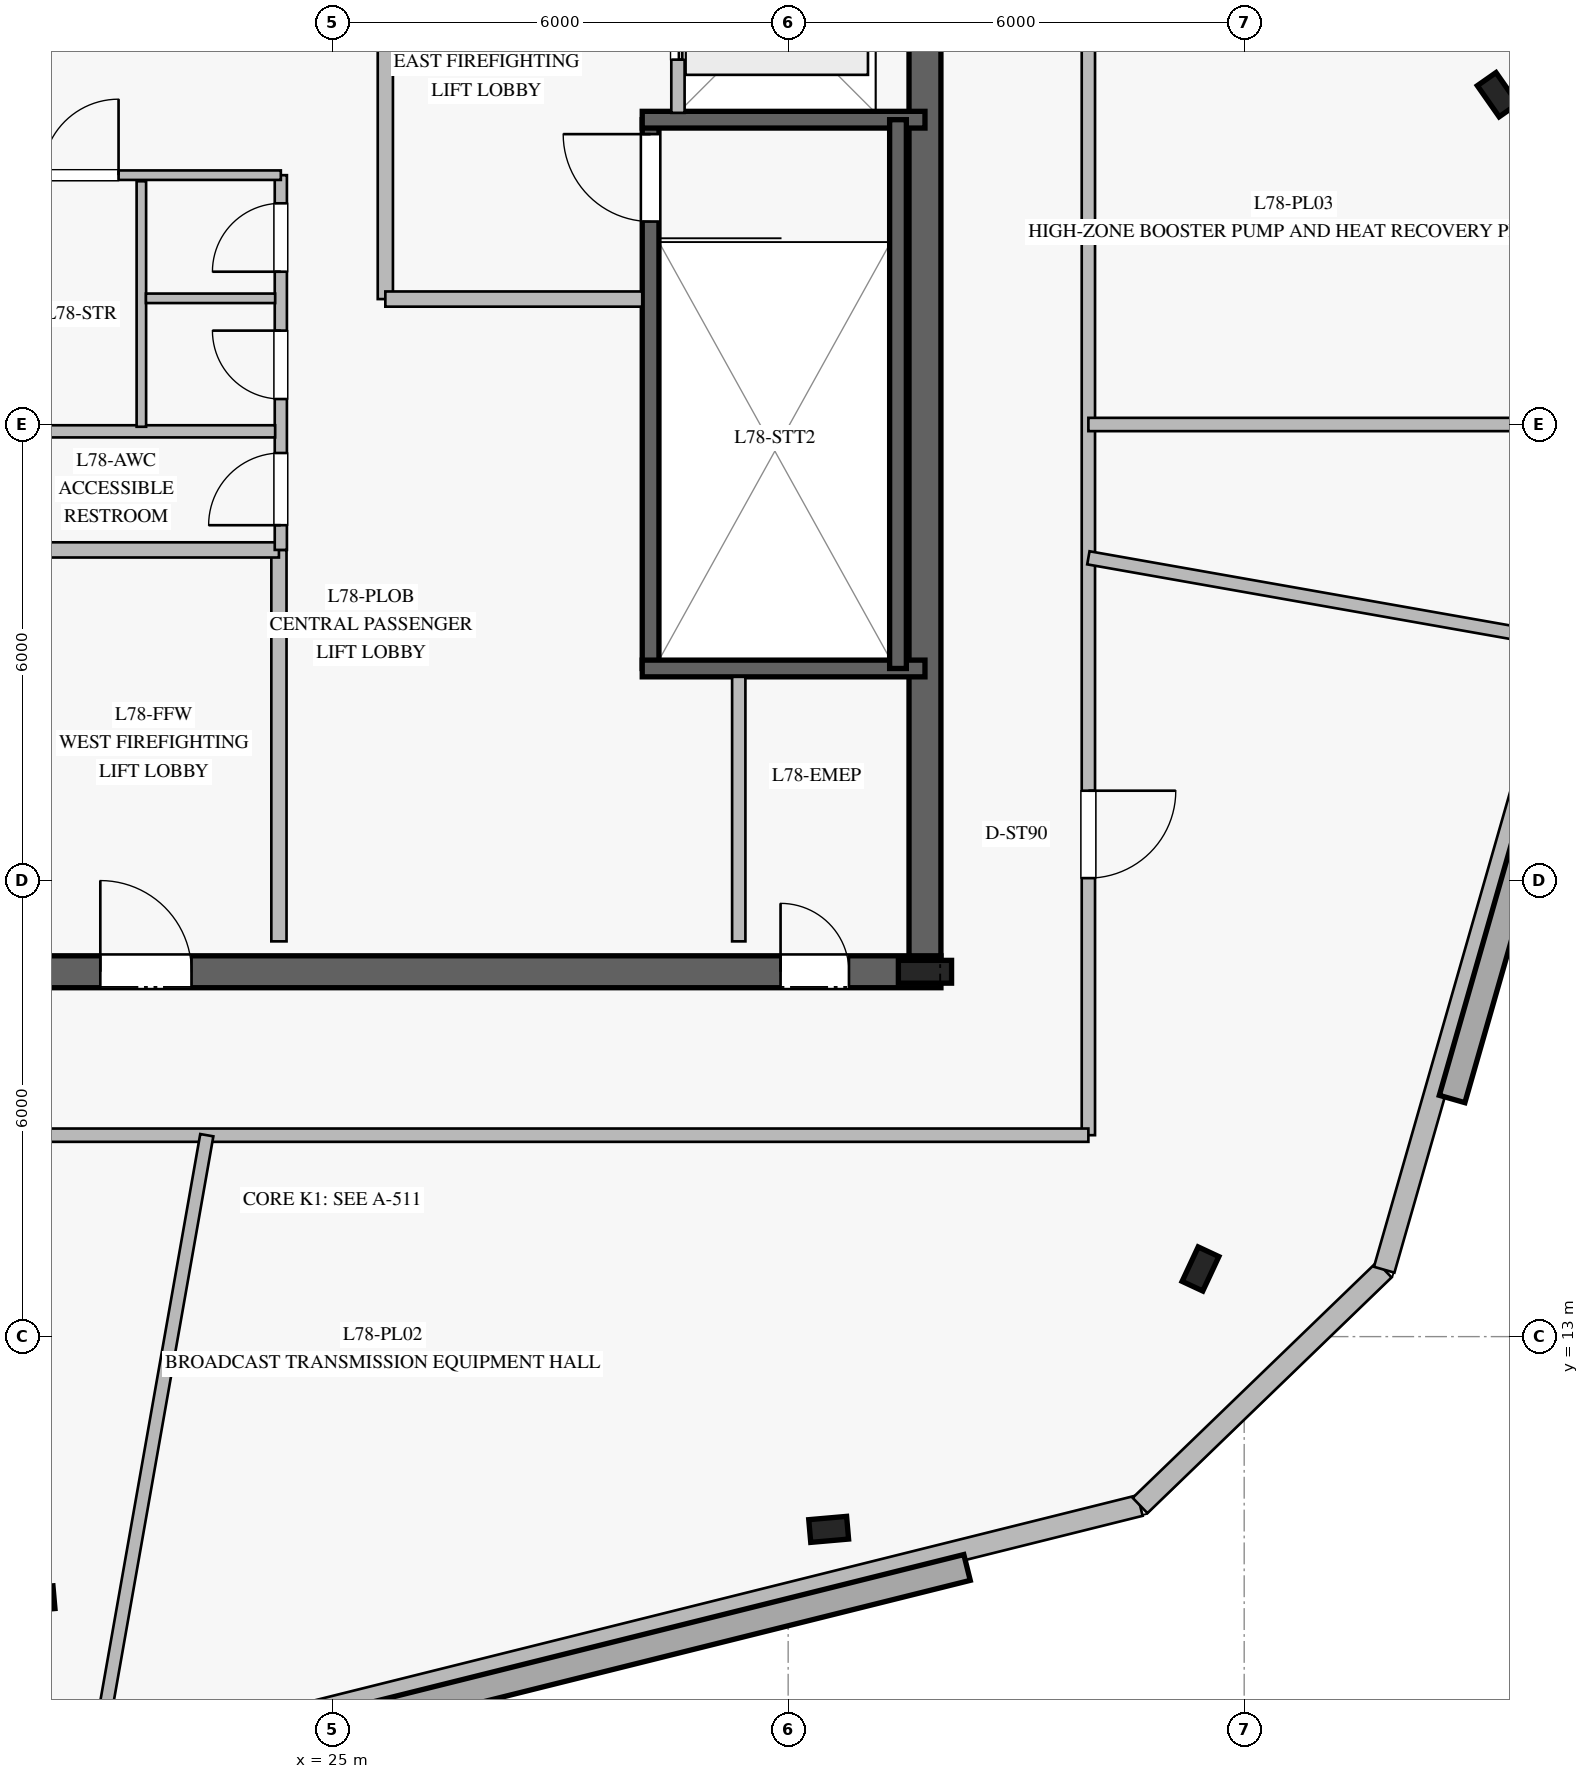
"""IFC4 building model, lengths in metres.
Left out: names, types, materials, properties, quantities, classifications, styles, units other than length and angle.
Written with IfcOpenShell. Run it as: python <this file> out.ifc"""

import sys

from ifc_helpers import new_model, si_unit, direction, frame, frame_2d, origin, origin_2d, place, context, subcontext, project, spatial, rectangle, i_section, extrude, element, fill, save


model = new_model("IFC4")
c1 = context("Model", 3, precision=1e-05, world=origin(), true_north=direction((0.0, 1.0)))
c2 = subcontext(c1, "Body", "Model", "MODEL_VIEW")
j1 = project(units=[si_unit("LENGTHUNIT", "METRE"), si_unit("PLANEANGLEUNIT", "RADIAN")], contexts=[c1])
p1 = place(None, origin())
s1 = spatial("IfcSite", under=j1, at=p1, CompositionType="ELEMENT")
p2 = place(p1, origin())
s2 = spatial("IfcBuilding", under=s1, at=p2, CompositionType="ELEMENT")
p3 = place(p2, frame((0.0, 0.0, 322.6)))
s3 = spatial("IfcBuildingStorey", under=s2, at=p3, CompositionType="ELEMENT", Elevation=322.6)
p4 = place(p3, frame((16.99, 17.8, 0.0), z_axis=(0.0, 0.0, 1.0), x_axis=(1.0, 0.0, 0.0)))
e1 = element("IfcWall", 1, at=p4, inside=s3, PredefinedType="SHEAR", context=c2, shape_type="SweptSolid", body=[
    extrude(rectangle(XDim=16.02, YDim=0.42, at=frame_2d((8.01, 0.0))), origin(), (0.0, 0.0, 1.0), 4.1),
])
p5 = place(p4, frame((4.96, 0.0, 0.0)))
e2 = element("IfcOpeningElement", 2, at=p5, cuts=e1, PredefinedType="OPENING", context=c2, shape_type="SweptSolid", body=[
    extrude(rectangle(XDim=1.2, YDim=2.25, at=frame_2d((0.6, 1.125))), frame((0.0, 0.22, 0.0), z_axis=(0.0, -1.0, 0.0), x_axis=(1.0, 0.0, 0.0)), (0.0, 0.0, 1.0), 0.44),
])
p6 = place(p4, frame((13.91, 0.0, 0.0)))
e3 = element("IfcOpeningElement", 3, at=p6, cuts=e1, PredefinedType="OPENING", context=c2, shape_type="SweptSolid", body=[
    extrude(rectangle(XDim=0.9, YDim=2.1, at=frame_2d((0.45, 1.05))), frame((0.0, 0.22, 0.0), z_axis=(0.0, -1.0, 0.0), x_axis=(1.0, 0.0, 0.0)), (0.0, 0.0, 1.0), 0.44),
])
p7 = place(p3, frame((32.8, 18.01, 0.0), z_axis=(0.0, 0.0, 1.0), x_axis=(0.0, 1.0, 0.0)))
e4 = element("IfcWall", 4, at=p7, inside=s3, PredefinedType="SHEAR", context=c2, shape_type="SweptSolid", body=[
    extrude(rectangle(XDim=13.98, YDim=0.42, at=frame_2d((6.99, 0.0))), origin(), (0.0, 0.0, 1.0), 4.1),
])
p8 = place(p3, frame((32.8, 17.8, 0.0), z_axis=(0.0, 0.0, 1.0), x_axis=(1.0, 0.0, 0.0)))
e5 = element("IfcColumn", 5, at=p8, inside=s3, PredefinedType="COLUMN", context=c2, shape_type="SweptSolid", body=[
    extrude(i_section(OverallWidth=0.3, OverallDepth=0.7, WebThickness=0.017, FlangeThickness=0.032, at=origin_2d()), origin(), (0.0, 0.0, 1.0), 4.4),
])
p9 = place(p3, frame((29.19, 21.79, 0.0), z_axis=(0.0, 0.0, 1.0), x_axis=(0.0, 1.0, 0.0)))
e6 = element("IfcWall", 6, at=p9, inside=s3, PredefinedType="SOLIDWALL", context=c2, shape_type="SweptSolid", body=[
    extrude(rectangle(XDim=7.22, YDim=0.22, at=frame_2d((3.61, 0.0))), origin(), (0.0, 0.0, 1.0), 4.1),
])
p10 = place(p9, frame((5.88, 0.0, 0.0)))
e7 = element("IfcOpeningElement", 7, at=p10, cuts=e6, PredefinedType="OPENING", context=c2, shape_type="SweptSolid", body=[
    extrude(rectangle(XDim=1.15, YDim=2.2, at=frame_2d((0.575, 1.1))), frame((0.0, 0.12, 0.0), z_axis=(0.0, -1.0, 0.0), x_axis=(1.0, 0.0, 0.0)), (0.0, 0.0, 1.0), 0.24),
])
for number, where, z_axis, x_axis in (
    (8, (29.08, 21.79, 0.0), (0.0, 0.0, 1.0), (1.0, 0.0, 0.0)),
    (9, (29.08, 29.01, 0.0), (0.0, 0.0, 1.0), (1.0, 0.0, 0.0)),
):
    element("IfcWall", number, at=place(p3, frame(where, z_axis=z_axis, x_axis=x_axis)), inside=s3, PredefinedType="SOLIDWALL", context=c2, shape_type="SweptSolid", body=[
        extrude(rectangle(XDim=3.72, YDim=0.22, at=frame_2d((1.86, 0.0))), origin(), (0.0, 0.0, 1.0), 4.1),
    ])
p11 = place(p3, frame((32.445, 29.01, 0.0), z_axis=(0.0, 0.0, 1.0), x_axis=(0.0, -1.0, 0.0)))
e10 = element("IfcWall", 10, at=p11, inside=s3, PredefinedType="SOLIDWALL", context=c2, shape_type="SweptSolid", body=[
    extrude(rectangle(XDim=7.22, YDim=0.22, at=frame_2d((3.61, 0.0))), origin(), (0.0, 0.0, 1.0), 4.1),
])
for number, where, z_axis, x_axis in (
    (11, (31.533, 10.464, 0.0), (0.0, 0.0, 1.0), (0.996, 0.087, 0.0)),
    (12, (36.425, 13.89, 0.0), (0.0, 0.0, 1.0), (0.423, 0.906, 0.0)),
    (13, (40.334, 29.339, 0.0), (0.0, 0.0, 1.0), (-0.574, 0.819, 0.0)),
):
    element("IfcColumn", number, at=place(p3, frame(where, z_axis=z_axis, x_axis=x_axis)), inside=s3, PredefinedType="COLUMN", context=c2, shape_type="SweptSolid", body=[
        extrude(i_section(OverallWidth=0.3, OverallDepth=0.5, WebThickness=0.014, FlangeThickness=0.028, at=origin_2d()), origin(), (0.0, 0.0, 1.0), 4.4),
    ])
p12 = place(p3, frame((17.999, 8.683, 0.0), z_axis=(0.0, 0.0, 1.0), x_axis=(0.961215848043, -0.275797196272, 0.0)))
e14 = element("IfcWall", 14, at=p12, inside=s3, PredefinedType="STANDARD", context=c2, shape_type="SweptSolid", body=[
    extrude(rectangle(XDim=4.464, YDim=0.28, at=frame_2d((2.232, 0.0))), origin(), (0.0, 0.0, 1.0), 4.1),
])
p13 = place(p3, frame((22.29, 7.452, 0.0), z_axis=(0.0, 0.0, 1.0), x_axis=(0.970292733591, 0.241933898288, 0.0)))
e15 = element("IfcWall", 15, at=p13, inside=s3, PredefinedType="STANDARD", context=c2, shape_type="SweptSolid", body=[
    extrude(rectangle(XDim=13.748, YDim=0.28, at=frame_2d((6.874, 0.0))), origin(), (0.0, 0.0, 1.0), 4.1),
])
p14 = place(p3, frame((35.63, 10.778, 0.0), z_axis=(0.0, 0.0, 1.0), x_axis=(0.719355296742, 0.694642323106, 0.0)))
e16 = element("IfcWall", 16, at=p14, inside=s3, PredefinedType="STANDARD", context=c2, shape_type="SweptSolid", body=[
    extrude(rectangle(XDim=4.465, YDim=0.28, at=frame_2d((2.233, 0.0))), origin(), (0.0, 0.0, 1.0), 4.1),
])
p15 = place(p3, frame((38.842, 13.88, 0.0), z_axis=(0.0, 0.0, 1.0), x_axis=(0.275616991697, 0.961267535022, 0.0)))
e17 = element("IfcWall", 17, at=p15, inside=s3, PredefinedType="STANDARD", context=c2, shape_type="SweptSolid", body=[
    extrude(rectangle(XDim=13.748, YDim=0.28, at=frame_2d((6.874, 0.0))), origin(), (0.0, 0.0, 1.0), 4.1),
])
p16 = place(p3, frame((24.3, 18.2, 0.0), z_axis=(0.0, 0.0, 1.0), x_axis=(0.0, 1.0, 0.0)))
e18 = element("IfcWall", 18, at=p16, inside=s3, PredefinedType="PARTITIONING", context=c2, shape_type="SweptSolid", body=[
    extrude(rectangle(XDim=5.15, YDim=0.2, at=frame_2d((2.575, 0.0))), origin(), (0.0, 0.0, 1.0), 3.37),
])
p17 = place(p3, frame((20.92, 23.35, 0.0), z_axis=(0.0, 0.0, 1.0), x_axis=(1.0, 0.0, 0.0)))
e19 = element("IfcWall", 19, at=p17, inside=s3, PredefinedType="PARTITIONING", context=c2, shape_type="SweptSolid", body=[
    extrude(rectangle(XDim=3.38, YDim=0.2, at=frame_2d((1.69, 0.0))), origin(), (0.0, 0.0, 1.0), 2.82),
])
p18 = place(p3, frame((25.7, 26.65, 0.0), z_axis=(0.0, 0.0, 1.0), x_axis=(0.0, 1.0, 0.0)))
e20 = element("IfcWall", 20, at=p18, inside=s3, PredefinedType="PARTITIONING", context=c2, shape_type="SweptSolid", body=[
    extrude(rectangle(XDim=5.15, YDim=0.2, at=frame_2d((2.575, 0.0))), origin(), (0.0, 0.0, 1.0), 3.37),
])
p19 = place(p3, frame((25.7, 26.65, 0.0), z_axis=(0.0, 0.0, 1.0), x_axis=(1.0, 0.0, 0.0)))
e21 = element("IfcWall", 21, at=p19, inside=s3, PredefinedType="PARTITIONING", context=c2, shape_type="SweptSolid", body=[
    extrude(rectangle(XDim=3.38, YDim=0.2, at=frame_2d((1.69, 0.0))), origin(), (0.0, 0.0, 1.0), 2.82),
])
p20 = place(p3, frame((24.325, 23.35, 0.0), z_axis=(0.0, 0.0, 1.0), x_axis=(0.0, 1.0, 0.0)))
e22 = element("IfcWall", 22, at=p20, inside=s3, PredefinedType="PLUMBINGWALL", context=c2, shape_type="SweptSolid", body=[
    extrude(rectangle(XDim=4.93, YDim=0.16, at=frame_2d((2.465, 0.0))), origin(), (0.0, 0.0, 1.0), 2.82),
])
p21 = place(p20, frame((0.325, 0.0, 0.0)))
e23 = element("IfcOpeningElement", 23, at=p21, cuts=e22, PredefinedType="OPENING", context=c2, shape_type="SweptSolid", body=[
    extrude(rectangle(XDim=0.95, YDim=2.1, at=frame_2d((0.475, 1.05))), frame((0.0, 0.09, 0.0), z_axis=(0.0, -1.0, 0.0), x_axis=(1.0, 0.0, 0.0)), (0.0, 0.0, 1.0), 0.18),
])
p22 = place(p20, frame((1.985, 0.0, 0.0)))
e24 = element("IfcOpeningElement", 24, at=p22, cuts=e22, PredefinedType="OPENING", context=c2, shape_type="SweptSolid", body=[
    extrude(rectangle(XDim=0.9, YDim=2.1, at=frame_2d((0.45, 1.05))), frame((0.0, 0.09, 0.0), z_axis=(0.0, -1.0, 0.0), x_axis=(1.0, 0.0, 0.0)), (0.0, 0.0, 1.0), 0.18),
])
p23 = place(p20, frame((3.66, 0.0, 0.0)))
e25 = element("IfcOpeningElement", 25, at=p23, cuts=e22, PredefinedType="OPENING", context=c2, shape_type="SweptSolid", body=[
    extrude(rectangle(XDim=0.9, YDim=2.1, at=frame_2d((0.45, 1.05))), frame((0.0, 0.09, 0.0), z_axis=(0.0, -1.0, 0.0), x_axis=(1.0, 0.0, 0.0)), (0.0, 0.0, 1.0), 0.18),
])
p24 = place(p3, frame((20.92, 28.28, 0.0), z_axis=(0.0, 0.0, 1.0), x_axis=(1.0, 0.0, 0.0)))
e26 = element("IfcWall", 26, at=p24, inside=s3, PredefinedType="PARTITIONING", context=c2, shape_type="SweptSolid", body=[
    extrude(rectangle(XDim=3.405, YDim=0.125, at=frame_2d((1.703, 0.0))), origin(), (0.0, 0.0, 1.0), 2.82),
])
p25 = place(p24, frame((0.27, 0.0, 0.0)))
e27 = element("IfcOpeningElement", 27, at=p25, cuts=e26, PredefinedType="OPENING", context=c2, shape_type="SweptSolid", body=[
    extrude(rectangle(XDim=1.0, YDim=2.15, at=frame_2d((0.5, 1.075))), frame((0.0, 0.073, 0.0), z_axis=(0.0, -1.0, 0.0), x_axis=(1.0, 0.0, 0.0)), (0.0, 0.0, 1.0), 0.145),
])
p26 = place(p3, frame((20.95, 24.91, 0.0), z_axis=(0.0, 0.0, 1.0), x_axis=(1.0, 0.0, 0.0)))
e28 = element("IfcWall", 28, at=p26, inside=s3, PredefinedType="PLUMBINGWALL", context=c2, shape_type="SweptSolid", body=[
    extrude(rectangle(XDim=3.3, YDim=0.16, at=frame_2d((1.65, 0.0))), origin(), (0.0, 0.0, 1.0), 2.82),
])
p27 = place(p3, frame((22.49, 24.97, 0.0), z_axis=(0.0, 0.0, 1.0), x_axis=(0.0, 1.0, 0.0)))
e29 = element("IfcWall", 29, at=p27, inside=s3, PredefinedType="PARTITIONING", context=c2, shape_type="SweptSolid", body=[
    extrude(rectangle(XDim=3.23, YDim=0.125, at=frame_2d((1.615, 0.0))), origin(), (0.0, 0.0, 1.0), 2.82),
])
p28 = place(p3, frame((22.55, 26.66, 0.0), z_axis=(0.0, 0.0, 1.0), x_axis=(1.0, 0.0, 0.0)))
e30 = element("IfcWall", 30, at=p28, inside=s3, PredefinedType="PARTITIONING", context=c2, shape_type="SweptSolid", body=[
    extrude(rectangle(XDim=1.7, YDim=0.125, at=frame_2d((0.85, 0.0))), origin(), (0.0, 0.0, 1.0), 2.82),
])
p29 = place(p3, frame((30.35, 18.2, 0.0), z_axis=(0.0, 0.0, 1.0), x_axis=(0.0, 1.0, 0.0)))
e31 = element("IfcWall", 31, at=p29, inside=s3, PredefinedType="PARTITIONING", context=c2, shape_type="SweptSolid", body=[
    extrude(rectangle(XDim=3.48, YDim=0.175, at=frame_2d((1.74, 0.0))), origin(), (0.0, 0.0, 1.0), 4.17),
])
p30 = place(p3, frame((29.55, 29.1, 0.0), z_axis=(0.0, 0.0, 1.0), x_axis=(0.0, 1.0, 0.0)))
e32 = element("IfcWall", 32, at=p30, inside=s3, PredefinedType="PARTITIONING", context=c2, shape_type="SweptSolid", body=[
    extrude(rectangle(XDim=2.6, YDim=0.175, at=frame_2d((1.3, 0.0))), origin(), (0.0, 0.0, 1.0), 4.17),
])
p31 = place(p30, frame((0.7, 0.0, 0.0)))
e33 = element("IfcOpeningElement", 33, at=p31, cuts=e32, PredefinedType="OPENING", context=c2, shape_type="SweptSolid", body=[
    extrude(rectangle(XDim=1.2, YDim=2.2, at=frame_2d((0.6, 1.1))), frame((0.0, 0.098, 0.0), z_axis=(0.0, -1.0, 0.0), x_axis=(1.0, 0.0, 0.0)), (0.0, 0.0, 1.0), 0.195),
])
p32 = place(p3, frame((34.95, 34.35, 0.0), z_axis=(0.0, 0.0, 1.0), x_axis=(0.0, -1.0, 0.0)))
e34 = element("IfcWall", 34, at=p32, inside=s3, PredefinedType="PARTITIONING", context=c2, shape_type="SweptSolid", body=[
    extrude(rectangle(XDim=18.7, YDim=0.175, at=frame_2d((9.35, 0.0))), origin(), (0.0, 0.0, 1.0), 3.6),
])
p33 = place(p32, frame((14.168, 0.0, 0.0)))
e35 = element("IfcOpeningElement", 35, at=p33, cuts=e34, PredefinedType="OPENING", context=c2, shape_type="SweptSolid", body=[
    extrude(rectangle(XDim=1.15, YDim=2.2, at=frame_2d((0.575, 1.1))), frame((0.0, 0.098, 0.0), z_axis=(0.0, -1.0, 0.0), x_axis=(1.0, 0.0, 0.0)), (0.0, 0.0, 1.0), 0.195),
])
p34 = place(p3, frame((34.95, 15.65, 0.0), z_axis=(0.0, 0.0, 1.0), x_axis=(-1.0, 0.0, 0.0)))
e36 = element("IfcWall", 36, at=p34, inside=s3, PredefinedType="PARTITIONING", context=c2, shape_type="SweptSolid", body=[
    extrude(rectangle(XDim=19.9, YDim=0.175, at=frame_2d((9.95, 0.0))), origin(), (0.0, 0.0, 1.0), 3.6),
])
p35 = place(p34, frame((15.016, 0.0, 0.0)))
e37 = element("IfcOpeningElement", 37, at=p35, cuts=e36, PredefinedType="OPENING", context=c2, shape_type="SweptSolid", body=[
    extrude(rectangle(XDim=1.15, YDim=2.2, at=frame_2d((0.575, 1.1))), frame((0.0, 0.098, 0.0), z_axis=(0.0, -1.0, 0.0), x_axis=(1.0, 0.0, 0.0)), (0.0, 0.0, 1.0), 0.195),
])
p36 = place(p3, frame((23.351, 15.65, 0.0), z_axis=(0.0, 0.0, 1.0), x_axis=(-0.173619687581, -0.984812776158, 0.0)))
e38 = element("IfcWall", 38, at=p36, inside=s3, PredefinedType="PARTITIONING", context=c2, shape_type="SweptSolid", body=[
    extrude(rectangle(XDim=8.156, YDim=0.175, at=frame_2d((4.078, 0.0))), origin(), (0.0, 0.0, 1.0), 3.6),
])
p37 = place(p3, frame((34.95, 23.246, 0.0), z_axis=(0.0, 0.0, 1.0), x_axis=(0.984791769213, -0.173738801913, 0.0)))
e39 = element("IfcWall", 39, at=p37, inside=s3, PredefinedType="PARTITIONING", context=c2, shape_type="SweptSolid", body=[
    extrude(rectangle(XDim=6.286, YDim=0.175, at=frame_2d((3.143, 0.0))), origin(), (0.0, 0.0, 1.0), 3.6),
])
p38 = place(p3, frame((34.95, 25.0, 0.0), z_axis=(0.0, 0.0, 1.0), x_axis=(1.0, 0.0, 0.0)))
e40 = element("IfcWall", 40, at=p38, inside=s3, PredefinedType="PARTITIONING", context=c2, shape_type="SweptSolid", body=[
    extrude(rectangle(XDim=7.006, YDim=0.175, at=frame_2d((3.503, 0.0))), origin(), (0.0, 0.0, 1.0), 3.6),
])
p39 = place(p10, origin())
e41 = element("IfcDoor", 41, at=p39, inside=s3, OperationType="SINGLE_SWING_RIGHT", PredefinedType="DOOR", context=c2, shape_type="SweptSolid", body=[
    extrude(rectangle(XDim=1.15, YDim=2.2, at=frame_2d((0.575, 1.1))), frame((0.0, 0.025, 0.0), z_axis=(0.0, -1.0, 0.0), x_axis=(1.0, 0.0, 0.0)), (0.0, 0.0, 1.0), 0.05),
])
fill(e7, e41)
p40 = place(p5, origin())
e42 = element("IfcDoor", 42, at=p40, inside=s3, OperationType="SINGLE_SWING_LEFT", PredefinedType="DOOR", context=c2, shape_type="SweptSolid", body=[
    extrude(rectangle(XDim=1.2, YDim=2.25, at=frame_2d((0.6, 1.125))), frame((0.0, 0.025, 0.0), z_axis=(0.0, -1.0, 0.0), x_axis=(1.0, 0.0, 0.0)), (0.0, 0.0, 1.0), 0.05),
])
fill(e2, e42)
p41 = place(p21, origin())
e43 = element("IfcDoor", 43, at=p41, inside=s3, OperationType="SINGLE_SWING_LEFT", PredefinedType="DOOR", context=c2, shape_type="SweptSolid", body=[
    extrude(rectangle(XDim=0.95, YDim=2.1, at=frame_2d((0.475, 1.05))), frame((0.0, 0.025, 0.0), z_axis=(0.0, -1.0, 0.0), x_axis=(1.0, 0.0, 0.0)), (0.0, 0.0, 1.0), 0.05),
])
fill(e23, e43)
p42 = place(p22, origin())
e44 = element("IfcDoor", 44, at=p42, inside=s3, OperationType="SINGLE_SWING_RIGHT", PredefinedType="DOOR", context=c2, shape_type="SweptSolid", body=[
    extrude(rectangle(XDim=0.9, YDim=2.1, at=frame_2d((0.45, 1.05))), frame((0.0, 0.025, 0.0), z_axis=(0.0, -1.0, 0.0), x_axis=(1.0, 0.0, 0.0)), (0.0, 0.0, 1.0), 0.05),
])
fill(e24, e44)
p43 = place(p23, origin())
e45 = element("IfcDoor", 45, at=p43, inside=s3, OperationType="SINGLE_SWING_LEFT", PredefinedType="DOOR", context=c2, shape_type="SweptSolid", body=[
    extrude(rectangle(XDim=0.9, YDim=2.1, at=frame_2d((0.45, 1.05))), frame((0.0, 0.025, 0.0), z_axis=(0.0, -1.0, 0.0), x_axis=(1.0, 0.0, 0.0)), (0.0, 0.0, 1.0), 0.05),
])
fill(e25, e45)
p44 = place(p25, origin())
e46 = element("IfcDoor", 46, at=p44, inside=s3, OperationType="SINGLE_SWING_RIGHT", PredefinedType="DOOR", context=c2, shape_type="SweptSolid", body=[
    extrude(rectangle(XDim=1.0, YDim=2.15, at=frame_2d((0.5, 1.075))), frame((0.0, 0.025, 0.0), z_axis=(0.0, -1.0, 0.0), x_axis=(1.0, 0.0, 0.0)), (0.0, 0.0, 1.0), 0.05),
])
fill(e27, e46)
p45 = place(p6, origin())
e47 = element("IfcDoor", 47, at=p45, inside=s3, OperationType="SINGLE_SWING_LEFT", PredefinedType="DOOR", context=c2, shape_type="SweptSolid", body=[
    extrude(rectangle(XDim=0.9, YDim=2.1, at=frame_2d((0.45, 1.05))), frame((0.0, 0.025, 0.0), z_axis=(0.0, -1.0, 0.0), x_axis=(1.0, 0.0, 0.0)), (0.0, 0.0, 1.0), 0.05),
])
fill(e3, e47)
p46 = place(p31, origin())
e48 = element("IfcDoor", 48, at=p46, inside=s3, OperationType="DOUBLE_DOOR_SLIDING", PredefinedType="DOOR", context=c2, shape_type="SweptSolid", body=[
    extrude(rectangle(XDim=1.2, YDim=2.2, at=frame_2d((0.6, 1.1))), frame((0.0, 0.025, 0.0), z_axis=(0.0, -1.0, 0.0), x_axis=(1.0, 0.0, 0.0)), (0.0, 0.0, 1.0), 0.05),
])
fill(e33, e48)
p47 = place(p33, origin())
e49 = element("IfcDoor", 49, at=p47, inside=s3, OperationType="SINGLE_SWING_LEFT", PredefinedType="DOOR", context=c2, shape_type="SweptSolid", body=[
    extrude(rectangle(XDim=1.15, YDim=2.2, at=frame_2d((0.575, 1.1))), frame((0.0, 0.025, 0.0), z_axis=(0.0, -1.0, 0.0), x_axis=(1.0, 0.0, 0.0)), (0.0, 0.0, 1.0), 0.05),
])
fill(e35, e49)
save(model, sys.argv[1])
